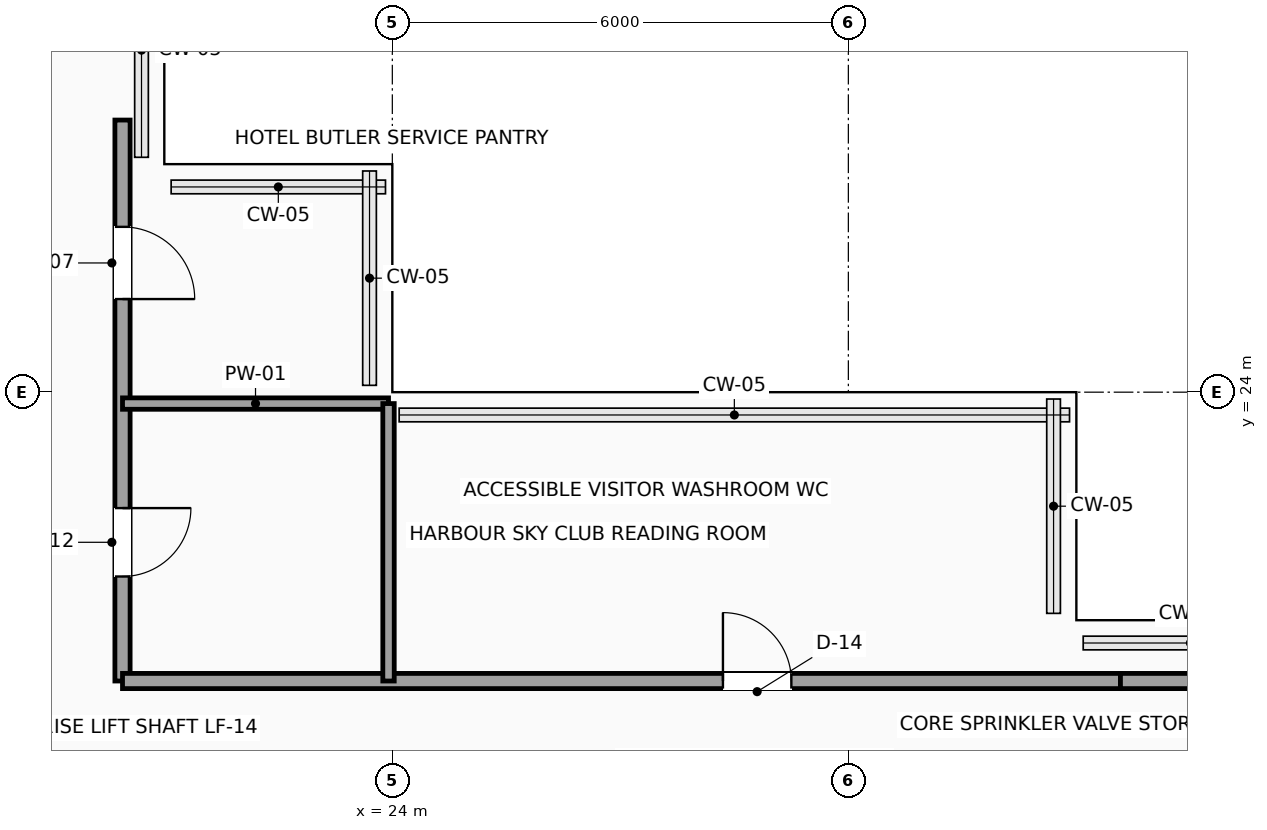
"""IFC4 building model, lengths in metres.
Left out: names, types, materials, properties, quantities, classifications, styles, units other than length and angle.
Written with IfcOpenShell. Run it as: python <this file> out.ifc"""

import sys

from ifc_helpers import new_model, si_unit, direction, frame, frame_2d, origin, place, context, subcontext, project, spatial, rectangle, extrude, element, fill, save


model = new_model("IFC4")
c1 = context("Model", 3, precision=1e-05, world=origin(), true_north=direction((0.0, 1.0)))
c2 = subcontext(c1, "Body", "Model", "MODEL_VIEW")
j1 = project(units=[si_unit("LENGTHUNIT", "METRE"), si_unit("PLANEANGLEUNIT", "RADIAN")], contexts=[c1])
p1 = place(None, origin())
s1 = spatial("IfcSite", under=j1, at=p1, CompositionType="ELEMENT")
p2 = place(p1, origin())
s2 = spatial("IfcBuilding", under=s1, at=p2, CompositionType="ELEMENT")
p3 = place(p2, frame((0.0, 0.0, 250.2)))
s3 = spatial("IfcBuildingStorey", under=s2, at=p3, CompositionType="ELEMENT", Elevation=250.2)
p4 = place(p3, frame((20.45, 27.58, 0.0), z_axis=(0.0, 0.0, 1.0), x_axis=(0.0, -1.0, 0.0)))
e1 = element("IfcWall", 1, at=p4, inside=s3, PredefinedType="SOLIDWALL", context=c2, shape_type="SweptSolid", body=[
    extrude(rectangle(XDim=7.38, YDim=0.2, at=frame_2d((3.69, 0.0))), origin(), (0.0, 0.0, 1.0), 3.3),
])
p5 = place(p4, frame((5.105, 0.0, 0.0)))
e2 = element("IfcOpeningElement", 2, at=p5, cuts=e1, PredefinedType="OPENING", context=c2, shape_type="SweptSolid", body=[
    extrude(rectangle(XDim=0.9, YDim=2.1, at=frame_2d((0.45, 1.05))), frame((0.0, 0.11, 0.0), z_axis=(0.0, -1.0, 0.0), x_axis=(1.0, 0.0, 0.0)), (0.0, 0.0, 1.0), 0.22),
])
p6 = place(p4, frame((1.405, 0.0, 0.0)))
e3 = element("IfcOpeningElement", 3, at=p6, cuts=e1, PredefinedType="OPENING", context=c2, shape_type="SweptSolid", body=[
    extrude(rectangle(XDim=0.95, YDim=2.15, at=frame_2d((0.475, 1.075))), frame((0.0, 0.11, 0.0), z_axis=(0.0, -1.0, 0.0), x_axis=(1.0, 0.0, 0.0)), (0.0, 0.0, 1.0), 0.22),
])
p7 = place(p3, frame((20.45, 20.2, 0.0), z_axis=(0.0, 0.0, 1.0), x_axis=(1.0, 0.0, 0.0)))
e4 = element("IfcWall", 4, at=p7, inside=s3, PredefinedType="SOLIDWALL", context=c2, shape_type="SweptSolid", body=[
    extrude(rectangle(XDim=13.13, YDim=0.2, at=frame_2d((6.565, 0.0))), origin(), (0.0, 0.0, 1.0), 3.3),
])
p8 = place(p7, frame((7.9, 0.0, 0.0)))
e5 = element("IfcOpeningElement", 5, at=p8, cuts=e4, PredefinedType="OPENING", context=c2, shape_type="SweptSolid", body=[
    extrude(rectangle(XDim=0.9, YDim=2.1, at=frame_2d((0.45, 1.05))), frame((0.0, 0.11, 0.0), z_axis=(0.0, -1.0, 0.0), x_axis=(1.0, 0.0, 0.0)), (0.0, 0.0, 1.0), 0.22),
])
p9 = place(p3, frame((33.58, 20.2, 0.0), z_axis=(0.0, 0.0, 1.0), x_axis=(1.0, 0.0, 0.0)))
e6 = element("IfcWall", 6, at=p9, inside=s3, PredefinedType="SOLIDWALL", context=c2, shape_type="SweptSolid", body=[
    extrude(rectangle(XDim=2.12, YDim=0.2, at=frame_2d((1.06, 0.0))), origin(), (0.0, 0.0, 1.0), 3.3),
])
p10 = place(p3, frame((20.45, 23.85, 0.0), z_axis=(0.0, 0.0, 1.0), x_axis=(1.0, 0.0, 0.0)))
e7 = element("IfcWall", 7, at=p10, inside=s3, PredefinedType="PARTITIONING", context=c2, shape_type="SweptSolid", body=[
    extrude(rectangle(XDim=3.5, YDim=0.15, at=frame_2d((1.75, 0.0))), origin(), (0.0, 0.0, 1.0), 3.3),
])
p11 = place(p3, frame((23.95, 20.2, 0.0), z_axis=(0.0, 0.0, 1.0), x_axis=(0.0, 1.0, 0.0)))
e8 = element("IfcWall", 8, at=p11, inside=s3, PredefinedType="PARTITIONING", context=c2, shape_type="SweptSolid", body=[
    extrude(rectangle(XDim=3.65, YDim=0.15, at=frame_2d((1.825, 0.0))), origin(), (0.0, 0.0, 1.0), 3.3),
])
p12 = place(p5, origin())
e9 = element("IfcDoor", 9, at=p12, inside=s3, OperationType="SINGLE_SWING_LEFT", PredefinedType="DOOR", context=c2, shape_type="SweptSolid", body=[
    extrude(rectangle(XDim=0.9, YDim=2.1, at=frame_2d((0.45, 1.05))), frame((0.0, 0.025, 0.0), z_axis=(0.0, -1.0, 0.0), x_axis=(1.0, 0.0, 0.0)), (0.0, 0.0, 1.0), 0.05),
])
fill(e2, e9)
p13 = place(p6, origin())
e10 = element("IfcDoor", 10, at=p13, inside=s3, OperationType="SINGLE_SWING_RIGHT", PredefinedType="DOOR", context=c2, shape_type="SweptSolid", body=[
    extrude(rectangle(XDim=0.95, YDim=2.15, at=frame_2d((0.475, 1.075))), frame((0.0, 0.025, 0.0), z_axis=(0.0, -1.0, 0.0), x_axis=(1.0, 0.0, 0.0)), (0.0, 0.0, 1.0), 0.05),
])
fill(e3, e10)
p14 = place(p8, origin())
e11 = element("IfcDoor", 11, at=p14, inside=s3, OperationType="SINGLE_SWING_LEFT", PredefinedType="DOOR", context=c2, shape_type="SweptSolid", body=[
    extrude(rectangle(XDim=0.9, YDim=2.1, at=frame_2d((0.45, 1.05))), frame((0.0, 0.025, 0.0), z_axis=(0.0, -1.0, 0.0), x_axis=(1.0, 0.0, 0.0)), (0.0, 0.0, 1.0), 0.05),
])
fill(e5, e11)
save(model, sys.argv[1])
